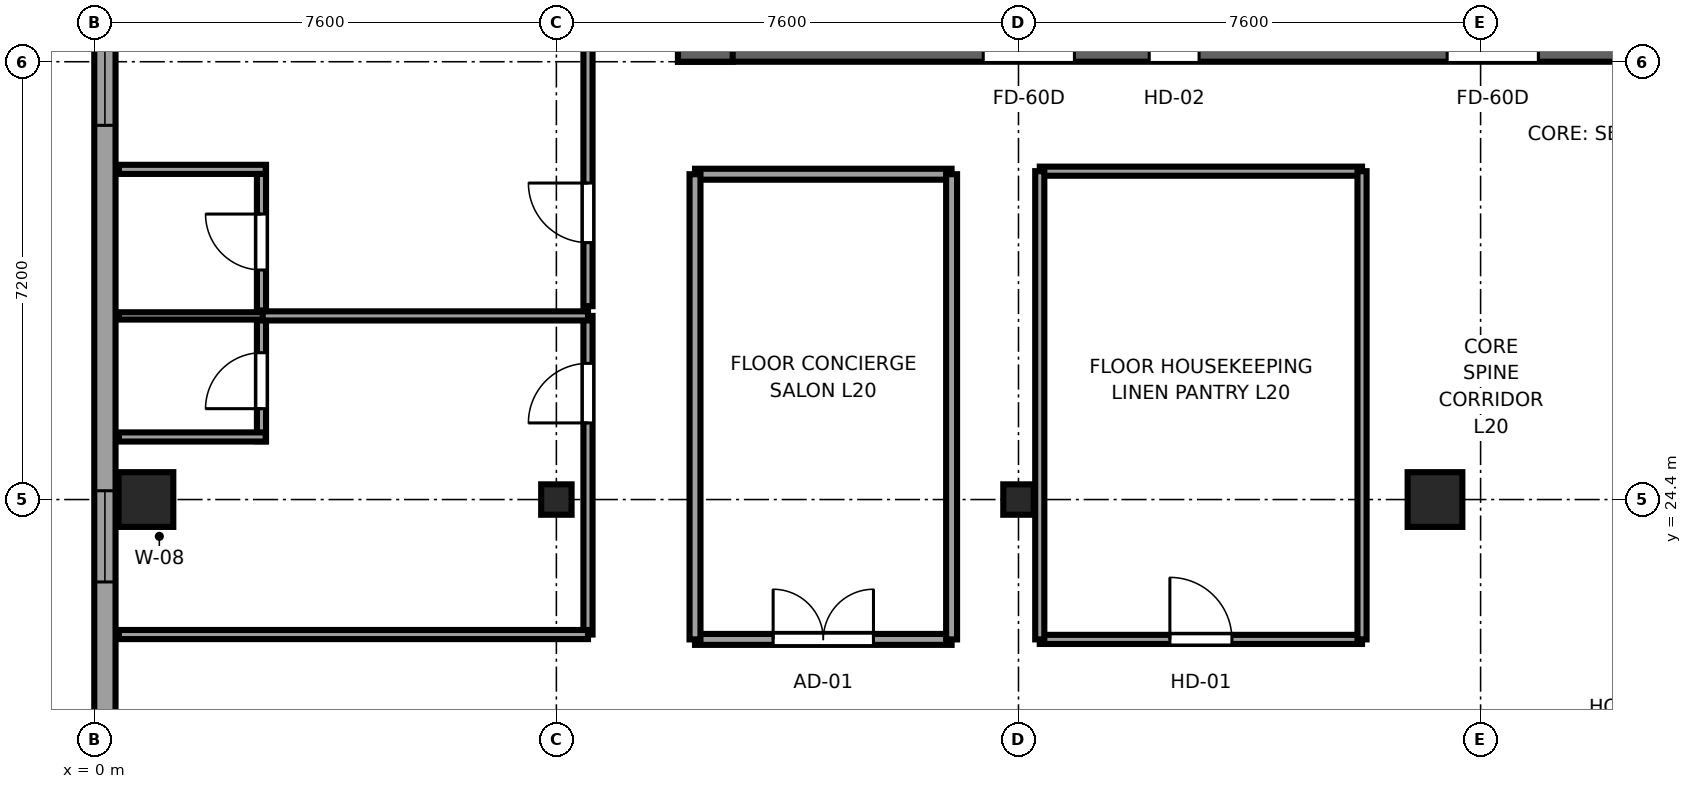
"""IFC4 building model, lengths in metres.
Left out: names, types, materials, properties, quantities, classifications, styles, units other than length and angle.
Written with IfcOpenShell. Run it as: python <this file> out.ifc"""

import sys

from ifc_helpers import new_model, si_unit, direction, frame, frame_2d, origin, origin_2d, place, context, subcontext, project, spatial, rectangle, i_section, extrude, source, transform, mapped, element, fill, save


model = new_model("IFC4")
c1 = context("Model", 3, precision=1e-05, world=origin(), true_north=direction((0.0, 1.0)))
c2 = subcontext(c1, "Body", "Model", "MODEL_VIEW")
j1 = project(units=[si_unit("LENGTHUNIT", "METRE"), si_unit("PLANEANGLEUNIT", "RADIAN")], contexts=[c1])
p1 = place(None, origin())
s1 = spatial("IfcSite", under=j1, at=p1, CompositionType="ELEMENT")
p2 = place(p1, origin())
s2 = spatial("IfcBuilding", under=s1, at=p2, CompositionType="ELEMENT")
p3 = place(p2, frame((0.0, 0.0, 81.7)))
s3 = spatial("IfcBuildingStorey", under=s2, at=p3, CompositionType="ELEMENT", Elevation=81.7)
p4 = place(p3, frame((9.6, 32.05, 0.0), z_axis=(0.0, 0.0, 1.0), x_axis=(1.0, 0.0, 0.0)))
e1 = element("IfcWall", 1, at=p4, inside=s3, PredefinedType="SHEAR", context=c2, shape_type="SweptSolid", body=[
    extrude(rectangle(XDim=26.8, YDim=0.9, at=frame_2d((13.4, 0.0))), origin(), (0.0, 0.0, 1.0), 3.55),
])
p5 = place(p4, frame((6.52, 0.0, 0.0), z_axis=(0.0, 0.0, 1.0), x_axis=(-1.0, 0.0, 0.0)))
e2 = element("IfcOpeningElement", 2, at=p5, cuts=e1, PredefinedType="OPENING", context=c2, shape_type="SweptSolid", body=[
    extrude(rectangle(XDim=1.5, YDim=2.04, at=frame_2d((0.75, 1.02))), frame((0.0, 0.46, 0.0), z_axis=(0.0, -1.0, 0.0), x_axis=(1.0, 0.0, 0.0)), (0.0, 0.0, 1.0), 0.92),
])
p6 = place(p4, frame((14.15, 0.0, 0.0), z_axis=(0.0, 0.0, 1.0), x_axis=(-1.0, 0.0, 0.0)))
e3 = element("IfcOpeningElement", 3, at=p6, cuts=e1, PredefinedType="OPENING", context=c2, shape_type="SweptSolid", body=[
    extrude(rectangle(XDim=1.5, YDim=2.04, at=frame_2d((0.75, 1.02))), frame((0.0, 0.46, 0.0), z_axis=(0.0, -1.0, 0.0), x_axis=(1.0, 0.0, 0.0)), (0.0, 0.0, 1.0), 0.92),
])
p7 = place(p4, frame((21.78, 0.0, 0.0), z_axis=(0.0, 0.0, 1.0), x_axis=(-1.0, 0.0, 0.0)))
e4 = element("IfcOpeningElement", 4, at=p7, cuts=e1, PredefinedType="OPENING", context=c2, shape_type="SweptSolid", body=[
    extrude(rectangle(XDim=1.5, YDim=2.04, at=frame_2d((0.75, 1.02))), frame((0.0, 0.46, 0.0), z_axis=(0.0, -1.0, 0.0), x_axis=(1.0, 0.0, 0.0)), (0.0, 0.0, 1.0), 0.92),
])
p8 = place(p4, frame((8.57, 0.0, 0.0), z_axis=(0.0, 0.0, 1.0), x_axis=(-1.0, 0.0, 0.0)))
e5 = element("IfcOpeningElement", 5, at=p8, cuts=e1, PredefinedType="OPENING", context=c2, shape_type="SweptSolid", body=[
    extrude(rectangle(XDim=0.82, YDim=2.01, at=frame_2d((0.41, 1.005))), frame((0.0, 0.46, 0.0), z_axis=(0.0, -1.0, 0.0), x_axis=(1.0, 0.0, 0.0)), (0.0, 0.0, 1.0), 0.92),
])
p9 = place(p4, frame((19.07, 0.0, 0.0), z_axis=(0.0, 0.0, 1.0), x_axis=(-1.0, 0.0, 0.0)))
e6 = element("IfcOpeningElement", 6, at=p9, cuts=e1, PredefinedType="OPENING", context=c2, shape_type="SweptSolid", body=[
    extrude(rectangle(XDim=0.82, YDim=2.01, at=frame_2d((0.41, 1.005))), frame((0.0, 0.46, 0.0), z_axis=(0.0, -1.0, 0.0), x_axis=(1.0, 0.0, 0.0)), (0.0, 0.0, 1.0), 0.92),
])
p10 = place(p3, frame((10.05, 31.6, 0.0), z_axis=(0.0, 0.0, 1.0), x_axis=(0.0, 1.0, 0.0)))
e7 = element("IfcWall", 7, at=p10, inside=s3, PredefinedType="SHEAR", context=c2, shape_type="SweptSolid", body=[
    extrude(rectangle(XDim=13.6, YDim=0.9, at=frame_2d((6.8, 0.0))), origin(), (0.0, 0.0, 1.0), 3.55),
])
m1 = source(origin(), c2, "Body", "SweptSolid", [
    extrude(rectangle(XDim=0.9, YDim=0.9, at=origin_2d()), origin(), (0.0, 0.0, 1.0), 3.55),
])
p11 = place(p3, frame((0.85, 24.4, 0.0), z_axis=(0.0, 0.0, 1.0), x_axis=(1.0, 0.0, 0.0)))
e8 = element("IfcColumn", 8, at=p11, inside=s3, PredefinedType="COLUMN", context=c2, shape_type="MappedRepresentation", body=[
    mapped(m1, transform((0.0, 0.0, 0.0), x_axis=(1.0, 0.0, 0.0), y_axis=(0.0, 1.0, 0.0), z_axis=(0.0, 0.0, 1.0), scale=1.0)),
])
m2 = source(origin(), c2, "Body", "SweptSolid", [
    extrude(i_section(OverallWidth=0.5, OverallDepth=0.5, WebThickness=0.022, FlangeThickness=0.034, at=origin_2d()), origin(), (0.0, 0.0, 1.0), 3.55),
])
for number, where, z_axis, x_axis in (
    (9, (7.6, 24.4, 0.0), (0.0, 0.0, 1.0), (1.0, 0.0, 0.0)),
    (10, (15.2, 24.4, 0.0), (0.0, 0.0, 1.0), (1.0, 0.0, 0.0)),
):
    element("IfcColumn", number, at=place(p3, frame(where, z_axis=z_axis, x_axis=x_axis)), inside=s3, PredefinedType="COLUMN", context=c2, shape_type="MappedRepresentation", body=[
        mapped(m2, transform((0.0, 0.0, 0.0), x_axis=(1.0, 0.0, 0.0), y_axis=(0.0, 1.0, 0.0), z_axis=(0.0, 0.0, 1.0), scale=1.0)),
    ])
p12 = place(p3, frame((22.05, 24.4, 0.0), z_axis=(0.0, 0.0, 1.0), x_axis=(1.0, 0.0, 0.0)))
e11 = element("IfcColumn", 11, at=p12, inside=s3, PredefinedType="COLUMN", context=c2, shape_type="MappedRepresentation", body=[
    mapped(m1, transform((0.0, 0.0, 0.0), x_axis=(1.0, 0.0, 0.0), y_axis=(0.0, 1.0, 0.0), z_axis=(0.0, 0.0, 1.0), scale=1.0)),
])
p13 = place(p3, frame((0.175, 41.383, 0.0), z_axis=(0.0, 0.0, 1.0), x_axis=(0.0, -1.0, 0.0)))
e12 = element("IfcWall", 12, at=p13, inside=s3, PredefinedType="SOLIDWALL", context=c2, shape_type="SweptSolid", body=[
    extrude(rectangle(XDim=36.766, YDim=0.35, at=frame_2d((18.383, 0.0))), origin(), (0.0, 0.0, 1.0), 3.37),
])
p14 = place(p13, frame((1.676, 0.0, 0.68)))
e13 = element("IfcOpeningElement", 13, at=p14, cuts=e12, PredefinedType="OPENING", context=c2, shape_type="SweptSolid", body=[
    extrude(rectangle(XDim=1.8, YDim=1.85, at=frame_2d((0.9, 0.925))), frame((0.0, 0.185, 0.0), z_axis=(0.0, -1.0, 0.0), x_axis=(1.0, 0.0, 0.0)), (0.0, 0.0, 1.0), 0.37),
])
p15 = place(p13, frame((4.578, 0.0, 0.68)))
e14 = element("IfcOpeningElement", 14, at=p15, cuts=e12, PredefinedType="OPENING", context=c2, shape_type="SweptSolid", body=[
    extrude(rectangle(XDim=1.8, YDim=1.85, at=frame_2d((0.9, 0.925))), frame((0.0, 0.185, 0.0), z_axis=(0.0, -1.0, 0.0), x_axis=(1.0, 0.0, 0.0)), (0.0, 0.0, 1.0), 0.37),
])
p16 = place(p13, frame((9.029, 0.0, 0.68)))
e15 = element("IfcOpeningElement", 15, at=p16, cuts=e12, PredefinedType="OPENING", context=c2, shape_type="SweptSolid", body=[
    extrude(rectangle(XDim=1.8, YDim=1.85, at=frame_2d((0.9, 0.925))), frame((0.0, 0.185, 0.0), z_axis=(0.0, -1.0, 0.0), x_axis=(1.0, 0.0, 0.0)), (0.0, 0.0, 1.0), 0.37),
])
p17 = place(p13, frame((21.985, 0.0, 0.68)))
e16 = element("IfcOpeningElement", 16, at=p17, cuts=e12, PredefinedType="OPENING", context=c2, shape_type="SweptSolid", body=[
    extrude(rectangle(XDim=1.8, YDim=1.85, at=frame_2d((0.9, 0.925))), frame((0.0, 0.185, 0.0), z_axis=(0.0, -1.0, 0.0), x_axis=(1.0, 0.0, 0.0)), (0.0, 0.0, 1.0), 0.37),
])
p18 = place(p13, frame((26.436, 0.0, 0.68)))
e17 = element("IfcOpeningElement", 17, at=p18, cuts=e12, PredefinedType="OPENING", context=c2, shape_type="SweptSolid", body=[
    extrude(rectangle(XDim=1.8, YDim=1.85, at=frame_2d((0.9, 0.925))), frame((0.0, 0.185, 0.0), z_axis=(0.0, -1.0, 0.0), x_axis=(1.0, 0.0, 0.0)), (0.0, 0.0, 1.0), 0.37),
])
p19 = place(p13, frame((29.338, 0.0, 0.68)))
e18 = element("IfcOpeningElement", 18, at=p19, cuts=e12, PredefinedType="OPENING", context=c2, shape_type="SweptSolid", body=[
    extrude(rectangle(XDim=1.8, YDim=1.85, at=frame_2d((0.9, 0.925))), frame((0.0, 0.185, 0.0), z_axis=(0.0, -1.0, 0.0), x_axis=(1.0, 0.0, 0.0)), (0.0, 0.0, 1.0), 0.37),
])
p20 = place(p13, frame((34.34, 0.0, 0.68)))
e19 = element("IfcOpeningElement", 19, at=p20, cuts=e12, PredefinedType="OPENING", context=c2, shape_type="SweptSolid", body=[
    extrude(rectangle(XDim=1.8, YDim=1.85, at=frame_2d((0.9, 0.925))), frame((0.0, 0.185, 0.0), z_axis=(0.0, -1.0, 0.0), x_axis=(1.0, 0.0, 0.0)), (0.0, 0.0, 1.0), 0.37),
])
p21 = place(p13, frame((16.838, 0.0, 0.62)))
e20 = element("IfcOpeningElement", 20, at=p21, cuts=e12, PredefinedType="OPENING", context=c2, shape_type="SweptSolid", body=[
    extrude(rectangle(XDim=1.5, YDim=1.55, at=frame_2d((0.75, 0.775))), frame((0.0, 0.185, 0.0), z_axis=(0.0, -1.0, 0.0), x_axis=(1.0, 0.0, 0.0)), (0.0, 0.0, 1.0), 0.37),
])
p22 = place(p3, frame((2.75, 25.359, 0.0), z_axis=(0.0, 0.0, 1.0), x_axis=(0.0, 1.0, 0.0)))
e21 = element("IfcWall", 21, at=p22, inside=s3, PredefinedType="PARTITIONING", context=c2, shape_type="SweptSolid", body=[
    extrude(rectangle(XDim=2.131, YDim=0.15, at=frame_2d((1.065, 0.0))), origin(), (0.0, 0.0, 1.0), 3.37),
])
p23 = place(p22, frame((0.535, 0.0, 0.0)))
e22 = element("IfcOpeningElement", 22, at=p23, cuts=e21, PredefinedType="OPENING", context=c2, shape_type="SweptSolid", body=[
    extrude(rectangle(XDim=0.92, YDim=2.01, at=frame_2d((0.46, 1.005))), frame((0.0, 0.085, 0.0), z_axis=(0.0, -1.0, 0.0), x_axis=(1.0, 0.0, 0.0)), (0.0, 0.0, 1.0), 0.17),
])
p24 = place(p3, frame((0.405, 25.429, 0.0), z_axis=(0.0, 0.0, 1.0), x_axis=(1.0, 0.0, 0.0)))
e23 = element("IfcWall", 23, at=p24, inside=s3, PredefinedType="PARTITIONING", context=c2, shape_type="SweptSolid", body=[
    extrude(rectangle(XDim=2.415, YDim=0.15, at=frame_2d((1.208, 0.0))), origin(), (0.0, 0.0, 1.0), 3.37),
])
p25 = place(p3, frame((0.405, 27.42, 0.0), z_axis=(0.0, 0.0, 1.0), x_axis=(1.0, 0.0, 0.0)))
e24 = element("IfcWall", 24, at=p25, inside=s3, PredefinedType="PLUMBINGWALL", context=c2, shape_type="SweptSolid", body=[
    extrude(rectangle(XDim=2.415, YDim=0.12, at=frame_2d((1.208, 0.0))), origin(), (0.0, 0.0, 1.0), 3.37),
])
p26 = place(p3, frame((2.75, 27.51, 0.0), z_axis=(0.0, 0.0, 1.0), x_axis=(0.0, 1.0, 0.0)))
e25 = element("IfcWall", 25, at=p26, inside=s3, PredefinedType="PARTITIONING", context=c2, shape_type="SweptSolid", body=[
    extrude(rectangle(XDim=2.39, YDim=0.15, at=frame_2d((1.195, 0.0))), origin(), (0.0, 0.0, 1.0), 3.37),
])
p27 = place(p26, frame((0.665, 0.0, 0.0)))
e26 = element("IfcOpeningElement", 26, at=p27, cuts=e25, PredefinedType="OPENING", context=c2, shape_type="SweptSolid", body=[
    extrude(rectangle(XDim=0.92, YDim=2.01, at=frame_2d((0.46, 1.005))), frame((0.0, 0.085, 0.0), z_axis=(0.0, -1.0, 0.0), x_axis=(1.0, 0.0, 0.0)), (0.0, 0.0, 1.0), 0.17),
])
p28 = place(p3, frame((0.405, 29.83, 0.0), z_axis=(0.0, 0.0, 1.0), x_axis=(1.0, 0.0, 0.0)))
e27 = element("IfcWall", 27, at=p28, inside=s3, PredefinedType="PARTITIONING", context=c2, shape_type="SweptSolid", body=[
    extrude(rectangle(XDim=2.415, YDim=0.15, at=frame_2d((1.208, 0.0))), origin(), (0.0, 0.0, 1.0), 3.37),
])
p29 = place(p3, frame((8.12, 22.18, 0.0), z_axis=(0.0, 0.0, 1.0), x_axis=(0.0, 1.0, 0.0)))
e28 = element("IfcWall", 28, at=p29, inside=s3, PredefinedType="PARTITIONING", context=c2, shape_type="SweptSolid", body=[
    extrude(rectangle(XDim=5.24, YDim=0.15, at=frame_2d((2.62, 0.0))), origin(), (0.0, 0.0, 1.0), 3.37),
])
p30 = place(p29, frame((3.48, 0.0, 0.0)))
e29 = element("IfcOpeningElement", 29, at=p30, cuts=e28, PredefinedType="OPENING", context=c2, shape_type="SweptSolid", body=[
    extrude(rectangle(XDim=0.98, YDim=2.12, at=frame_2d((0.49, 1.06))), frame((0.0, 0.085, 0.0), z_axis=(0.0, -1.0, 0.0), x_axis=(1.0, 0.0, 0.0)), (0.0, 0.0, 1.0), 0.17),
])
p31 = place(p3, frame((0.405, 22.18, 0.0), z_axis=(0.0, 0.0, 1.0), x_axis=(1.0, 0.0, 0.0)))
e30 = element("IfcWall", 30, at=p31, inside=s3, PredefinedType="PARTITIONING", context=c2, shape_type="SweptSolid", body=[
    extrude(rectangle(XDim=7.715, YDim=0.15, at=frame_2d((3.857, 0.0))), origin(), (0.0, 0.0, 1.0), 3.37),
])
p32 = place(p3, frame((2.77, 27.42, 0.0), z_axis=(0.0, 0.0, 1.0), x_axis=(1.0, 0.0, 0.0)))
e31 = element("IfcWall", 31, at=p32, inside=s3, PredefinedType="PARTITIONING", context=c2, shape_type="SweptSolid", body=[
    extrude(rectangle(XDim=5.35, YDim=0.15, at=frame_2d((2.675, 0.0))), origin(), (0.0, 0.0, 1.0), 3.37),
])
p33 = place(p3, frame((8.12, 27.58, 0.0), z_axis=(0.0, 0.0, 1.0), x_axis=(0.0, 1.0, 0.0)))
e32 = element("IfcWall", 32, at=p33, inside=s3, PredefinedType="PARTITIONING", context=c2, shape_type="SweptSolid", body=[
    extrude(rectangle(XDim=18.015, YDim=0.15, at=frame_2d((9.007, 0.0))), origin(), (0.0, 0.0, 1.0), 3.37),
])
p34 = place(p33, frame((1.045, 0.0, 0.0)))
e33 = element("IfcOpeningElement", 33, at=p34, cuts=e32, PredefinedType="OPENING", context=c2, shape_type="SweptSolid", body=[
    extrude(rectangle(XDim=0.98, YDim=2.12, at=frame_2d((0.49, 1.06))), frame((0.0, 0.085, 0.0), z_axis=(0.0, -1.0, 0.0), x_axis=(1.0, 0.0, 0.0)), (0.0, 0.0, 1.0), 0.17),
])
p35 = place(p3, frame((9.88, 22.1, 0.0), z_axis=(0.0, 0.0, 1.0), x_axis=(1.0, 0.0, 0.0)))
e34 = element("IfcWall", 34, at=p35, inside=s3, PredefinedType="PARTITIONING", context=c2, shape_type="SweptSolid", body=[
    extrude(rectangle(XDim=4.22, YDim=0.18, at=frame_2d((2.11, 0.0))), origin(), (0.0, 0.0, 1.0), 3.37),
])
p36 = place(p35, frame((1.285, 0.0, 0.0)))
e35 = element("IfcOpeningElement", 35, at=p36, cuts=e34, PredefinedType="OPENING", context=c2, shape_type="SweptSolid", body=[
    extrude(rectangle(XDim=1.65, YDim=2.15, at=frame_2d((0.825, 1.075))), frame((0.0, 0.1, 0.0), z_axis=(0.0, -1.0, 0.0), x_axis=(1.0, 0.0, 0.0)), (0.0, 0.0, 1.0), 0.2),
])
p37 = place(p3, frame((9.88, 29.75, 0.0), z_axis=(0.0, 0.0, 1.0), x_axis=(1.0, 0.0, 0.0)))
e36 = element("IfcWall", 36, at=p37, inside=s3, PredefinedType="PARTITIONING", context=c2, shape_type="SweptSolid", body=[
    extrude(rectangle(XDim=4.22, YDim=0.18, at=frame_2d((2.11, 0.0))), origin(), (0.0, 0.0, 1.0), 3.37),
])
for number, where, z_axis, x_axis in (
    (37, (9.88, 22.1, 0.0), (0.0, 0.0, 1.0), (0.0, 1.0, 0.0)),
    (38, (14.1, 22.1, 0.0), (0.0, 0.0, 1.0), (0.0, 1.0, 0.0)),
):
    element("IfcWall", number, at=place(p3, frame(where, z_axis=z_axis, x_axis=x_axis)), inside=s3, PredefinedType="PARTITIONING", context=c2, shape_type="SweptSolid", body=[
        extrude(rectangle(XDim=7.65, YDim=0.18, at=frame_2d((3.825, 0.0))), origin(), (0.0, 0.0, 1.0), 3.37),
    ])
p38 = place(p3, frame((15.55, 22.1, 0.0), z_axis=(0.0, 0.0, 1.0), x_axis=(1.0, 0.0, 0.0)))
e39 = element("IfcWall", 39, at=p38, inside=s3, PredefinedType="PARTITIONING", context=c2, shape_type="SweptSolid", body=[
    extrude(rectangle(XDim=5.3, YDim=0.15, at=frame_2d((2.65, 0.0))), origin(), (0.0, 0.0, 1.0), 3.37),
])
p39 = place(p38, frame((2.14, 0.0, 0.0)))
e40 = element("IfcOpeningElement", 40, at=p39, cuts=e39, PredefinedType="OPENING", context=c2, shape_type="SweptSolid", body=[
    extrude(rectangle(XDim=1.02, YDim=2.03, at=frame_2d((0.51, 1.015))), frame((0.0, 0.085, 0.0), z_axis=(0.0, -1.0, 0.0), x_axis=(1.0, 0.0, 0.0)), (0.0, 0.0, 1.0), 0.17),
])
p40 = place(p3, frame((15.55, 29.8, 0.0), z_axis=(0.0, 0.0, 1.0), x_axis=(1.0, 0.0, 0.0)))
e41 = element("IfcWall", 41, at=p40, inside=s3, PredefinedType="PARTITIONING", context=c2, shape_type="SweptSolid", body=[
    extrude(rectangle(XDim=5.3, YDim=0.15, at=frame_2d((2.65, 0.0))), origin(), (0.0, 0.0, 1.0), 3.37),
])
for number, where, z_axis, x_axis in (
    (42, (15.55, 22.1, 0.0), (0.0, 0.0, 1.0), (0.0, 1.0, 0.0)),
    (43, (20.85, 22.1, 0.0), (0.0, 0.0, 1.0), (0.0, 1.0, 0.0)),
):
    element("IfcWall", number, at=place(p3, frame(where, z_axis=z_axis, x_axis=x_axis)), inside=s3, PredefinedType="PARTITIONING", context=c2, shape_type="SweptSolid", body=[
        extrude(rectangle(XDim=7.7, YDim=0.15, at=frame_2d((3.85, 0.0))), origin(), (0.0, 0.0, 1.0), 3.37),
    ])
m3 = source(origin(), c2, "Body", "SweptSolid", [
    extrude(rectangle(XDim=1.8, YDim=1.85, at=frame_2d((0.9, 0.925))), frame((0.0, 0.09, 0.0), z_axis=(0.0, -1.0, 0.0), x_axis=(1.0, 0.0, 0.0)), (0.0, 0.0, 1.0), 0.06),
])
p41 = place(p16, origin())
e44 = element("IfcWindow", 44, at=p41, inside=s3, PartitioningType="TRIPLE_PANEL_HORIZONTAL", PredefinedType="WINDOW", context=c2, shape_type="MappedRepresentation", body=[
    mapped(m3, transform((0.0, 0.0, 0.0), x_axis=(1.0, 0.0, 0.0), y_axis=(0.0, 1.0, 0.0), z_axis=(0.0, 0.0, 1.0), scale=1.0)),
])
fill(e15, e44)
m4 = source(origin(), c2, "Body", "SweptSolid", [
    extrude(rectangle(XDim=1.5, YDim=1.55, at=frame_2d((0.75, 0.775))), frame((0.0, 0.09, 0.0), z_axis=(0.0, -1.0, 0.0), x_axis=(1.0, 0.0, 0.0)), (0.0, 0.0, 1.0), 0.06),
])
p42 = place(p21, origin())
e45 = element("IfcWindow", 45, at=p42, inside=s3, PartitioningType="SINGLE_PANEL", PredefinedType="WINDOW", context=c2, shape_type="MappedRepresentation", body=[
    mapped(m4, transform((0.0, 0.0, 0.0), x_axis=(1.0, 0.0, 0.0), y_axis=(0.0, 1.0, 0.0), z_axis=(0.0, 0.0, 1.0), scale=1.0)),
])
fill(e20, e45)
m5 = source(origin(), c2, "Body", "SweptSolid", [
    extrude(rectangle(XDim=0.92, YDim=2.01, at=frame_2d((0.46, 1.005))), frame((0.0, 0.025, 0.0), z_axis=(0.0, -1.0, 0.0), x_axis=(1.0, 0.0, 0.0)), (0.0, 0.0, 1.0), 0.05),
])
p43 = place(p23, origin())
e46 = element("IfcDoor", 46, at=p43, inside=s3, OperationType="SINGLE_SWING_LEFT", PredefinedType="DOOR", context=c2, shape_type="MappedRepresentation", body=[
    mapped(m5, transform((0.0, 0.0, 0.0), x_axis=(1.0, 0.0, 0.0), y_axis=(0.0, 1.0, 0.0), z_axis=(0.0, 0.0, 1.0), scale=1.0)),
])
fill(e22, e46)
p44 = place(p27, origin())
e47 = element("IfcDoor", 47, at=p44, inside=s3, OperationType="SINGLE_SWING_RIGHT", PredefinedType="DOOR", context=c2, shape_type="MappedRepresentation", body=[
    mapped(m5, transform((0.0, 0.0, 0.0), x_axis=(1.0, 0.0, 0.0), y_axis=(0.0, 1.0, 0.0), z_axis=(0.0, 0.0, 1.0), scale=1.0)),
])
fill(e26, e47)
m6 = source(origin(), c2, "Body", "SweptSolid", [
    extrude(rectangle(XDim=0.98, YDim=2.12, at=frame_2d((0.49, 1.06))), frame((0.0, 0.025, 0.0), z_axis=(0.0, -1.0, 0.0), x_axis=(1.0, 0.0, 0.0)), (0.0, 0.0, 1.0), 0.05),
])
p45 = place(p30, origin())
e48 = element("IfcDoor", 48, at=p45, inside=s3, OperationType="SINGLE_SWING_LEFT", PredefinedType="DOOR", context=c2, shape_type="MappedRepresentation", body=[
    mapped(m6, transform((0.0, 0.0, 0.0), x_axis=(1.0, 0.0, 0.0), y_axis=(0.0, 1.0, 0.0), z_axis=(0.0, 0.0, 1.0), scale=1.0)),
])
fill(e29, e48)
p46 = place(p34, origin())
e49 = element("IfcDoor", 49, at=p46, inside=s3, OperationType="SINGLE_SWING_RIGHT", PredefinedType="DOOR", context=c2, shape_type="MappedRepresentation", body=[
    mapped(m6, transform((0.0, 0.0, 0.0), x_axis=(1.0, 0.0, 0.0), y_axis=(0.0, 1.0, 0.0), z_axis=(0.0, 0.0, 1.0), scale=1.0)),
])
fill(e33, e49)
m7 = source(origin(), c2, "Body", "SweptSolid", [
    extrude(rectangle(XDim=1.65, YDim=2.15, at=frame_2d((0.825, 1.075))), frame((0.0, 0.025, 0.0), z_axis=(0.0, -1.0, 0.0), x_axis=(1.0, 0.0, 0.0)), (0.0, 0.0, 1.0), 0.05),
])
p47 = place(p36, origin())
e50 = element("IfcDoor", 50, at=p47, inside=s3, OperationType="DOUBLE_DOOR_SINGLE_SWING", PredefinedType="DOOR", context=c2, shape_type="MappedRepresentation", body=[
    mapped(m7, transform((0.0, 0.0, 0.0), x_axis=(1.0, 0.0, 0.0), y_axis=(0.0, 1.0, 0.0), z_axis=(0.0, 0.0, 1.0), scale=1.0)),
])
fill(e35, e50)
m8 = source(origin(), c2, "Body", "SweptSolid", [
    extrude(rectangle(XDim=1.02, YDim=2.03, at=frame_2d((0.51, 1.015))), frame((0.0, 0.025, 0.0), z_axis=(0.0, -1.0, 0.0), x_axis=(1.0, 0.0, 0.0)), (0.0, 0.0, 1.0), 0.05),
])
p48 = place(p39, origin())
e51 = element("IfcDoor", 51, at=p48, inside=s3, OperationType="SINGLE_SWING_LEFT", PredefinedType="DOOR", context=c2, shape_type="MappedRepresentation", body=[
    mapped(m8, transform((0.0, 0.0, 0.0), x_axis=(1.0, 0.0, 0.0), y_axis=(0.0, 1.0, 0.0), z_axis=(0.0, 0.0, 1.0), scale=1.0)),
])
fill(e40, e51)
save(model, sys.argv[1])
